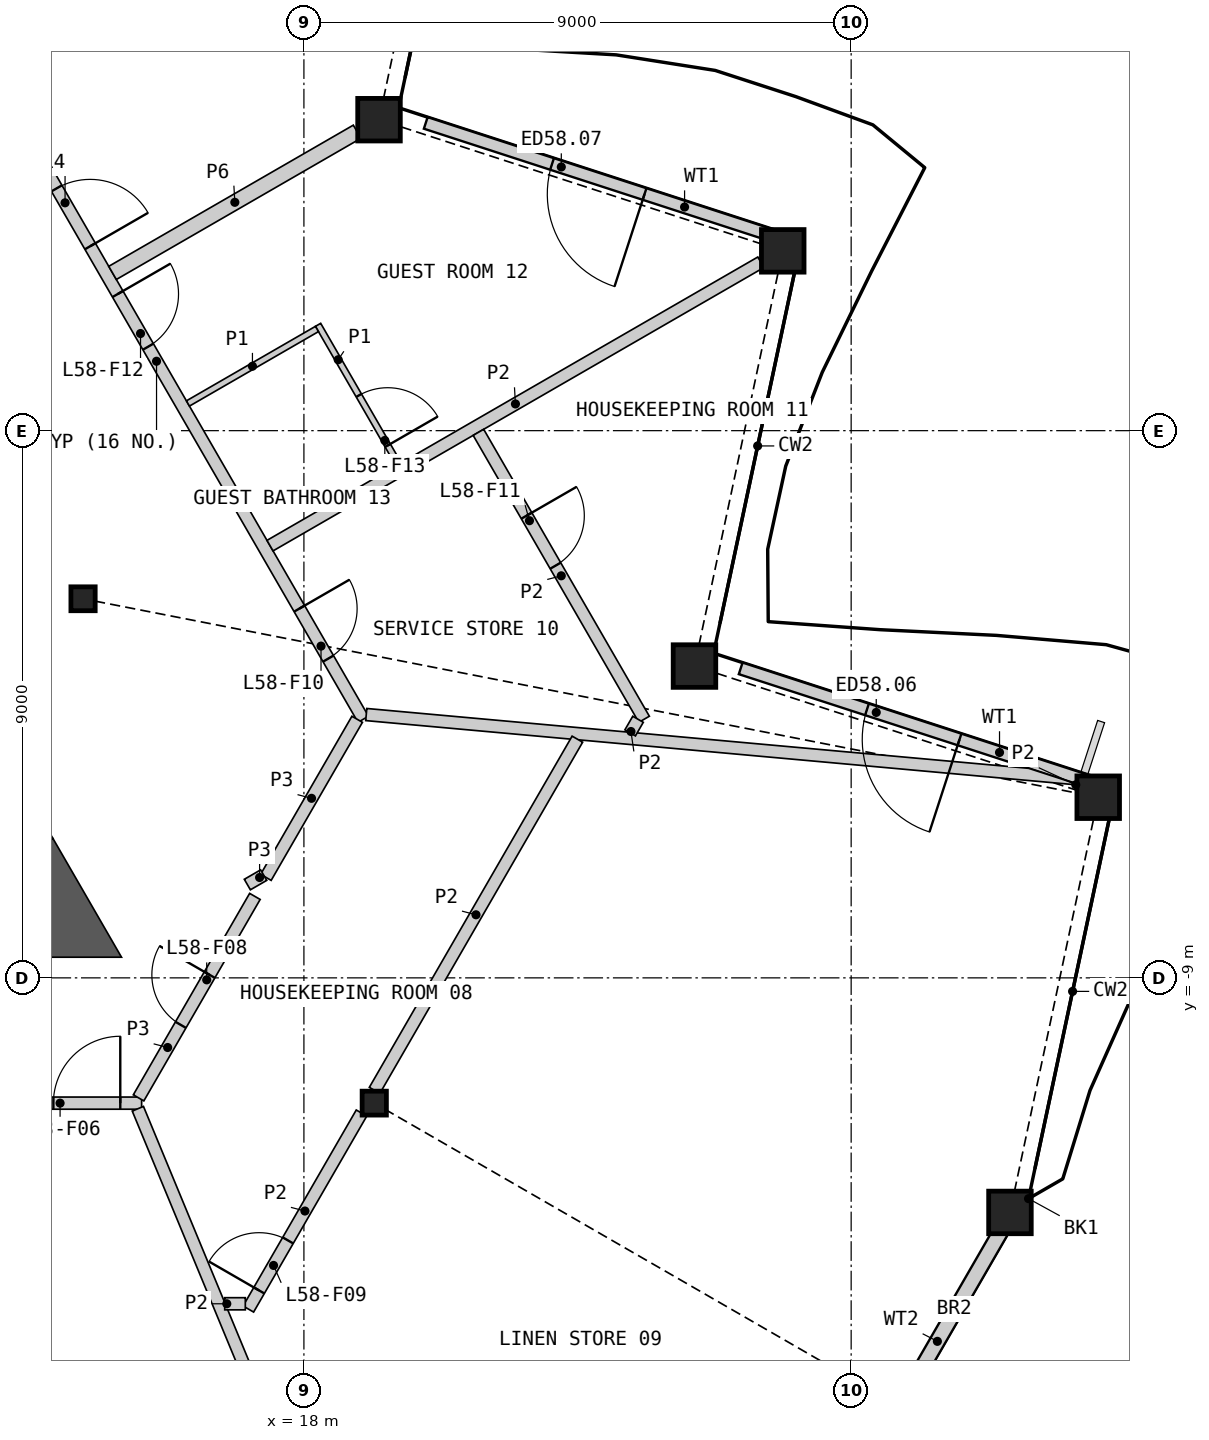
"""IFC4 building model, lengths in metres.
Left out: names, types, materials, properties, quantities, classifications, styles, units other than length and angle.
Written with IfcOpenShell. Run it as: python <this file> out.ifc"""

import sys

from ifc_helpers import new_model, si_unit, direction, frame, frame_2d, origin, origin_2d, place, context, subcontext, project, spatial, polyline, rectangle, hollow_rectangle, i_section, outline, extrude, element, fill, save


model = new_model("IFC4")
c1 = context("Model", 3, precision=1e-05, world=origin(), true_north=direction((0.0, 1.0)))
c2 = subcontext(c1, "Body", "Model", "MODEL_VIEW")
j1 = project(units=[si_unit("LENGTHUNIT", "METRE"), si_unit("PLANEANGLEUNIT", "RADIAN")], contexts=[c1])
p1 = place(None, origin())
s1 = spatial("IfcSite", under=j1, at=p1, CompositionType="ELEMENT")
p2 = place(p1, origin())
s2 = spatial("IfcBuilding", under=s1, at=p2, CompositionType="ELEMENT")
p3 = place(p2, frame((0.0, 0.0, 259.8)))
s3 = spatial("IfcBuildingStorey", under=s2, at=p3, CompositionType="ELEMENT", Elevation=259.8)
for number, where, z_axis, x_axis in (
    (1, (29.612, -12.858, 0.0), (0.0, 0.0, 1.0), (1.0, 0.0, 0.0)),
    (2, (31.063, -6.029, 0.0), (0.0, 0.0, 1.0), (1.0, 0.0, 0.0)),
    (3, (24.423, -3.872, 0.0), (0.0, 0.0, 1.0), (1.0, 0.0, 0.0)),
    (4, (25.875, 2.957, 0.0), (0.0, 0.0, 1.0), (1.0, 0.0, 0.0)),
    (5, (19.235, 5.115, 0.0), (0.0, 0.0, 1.0), (1.0, 0.0, 0.0)),
):
    element("IfcColumn", number, at=place(p3, frame(where, z_axis=z_axis, x_axis=x_axis)), inside=s3, PredefinedType="COLUMN", context=c2, shape_type="SweptSolid", body=[
        extrude(hollow_rectangle(XDim=0.7, YDim=0.7, WallThickness=0.045, at=origin_2d()), origin(), (0.0, 0.0, 1.0), 3.6),
    ])
for number, where, z_axis, x_axis in (
    (6, (19.157, -11.06, 0.0), (0.0, 0.0, 1.0), (1.0, 0.0, 0.0)),
    (7, (14.368, -2.765, 0.0), (0.0, 0.0, 1.0), (1.0, 0.0, 0.0)),
):
    element("IfcColumn", number, at=place(p3, frame(where, z_axis=z_axis, x_axis=x_axis)), inside=s3, PredefinedType="COLUMN", context=c2, shape_type="SweptSolid", body=[
        extrude(i_section(OverallWidth=0.399, OverallDepth=0.393, WebThickness=0.023, FlangeThickness=0.037, at=origin_2d()), origin(), (0.0, 0.0, 1.0), 3.6),
    ])
p4 = place(p3, frame((28.038, -15.637, 0.0), z_axis=(0.0, 0.0, 1.0), x_axis=(0.500023511883, 0.866011828767, 0.0)))
e8 = element("IfcWall", 8, at=p4, inside=s3, PredefinedType="SOLIDWALL", context=c2, shape_type="SweptSolid", body=[
    extrude(rectangle(XDim=3.042, YDim=0.25, at=frame_2d((1.521, 0.0))), origin(), (0.0, 0.0, 1.0), 2.701),
])
p5 = place(p3, frame((30.859, -5.754, 0.0), z_axis=(0.0, 0.0, 1.0), x_axis=(-0.951049400374, 0.309038894069, 0.0)))
e9 = element("IfcWall", 9, at=p5, inside=s3, PredefinedType="SOLIDWALL", context=c2, shape_type="SweptSolid", body=[
    extrude(rectangle(XDim=5.968, YDim=0.2, at=frame_2d((2.984, 0.0))), origin(), (0.0, 0.0, 1.0), 2.701),
])
p6 = place(p5, frame((2.184, 0.0, 0.0)))
e10 = element("IfcOpeningElement", 10, at=p6, cuts=e9, PredefinedType="OPENING", context=c2, shape_type="SweptSolid", body=[
    extrude(rectangle(XDim=1.6, YDim=2.4, at=frame_2d((0.8, 1.2))), frame((0.0, 0.11, 0.0), z_axis=(0.0, -1.0, 0.0), x_axis=(1.0, 0.0, 0.0)), (0.0, 0.0, 1.0), 0.22),
])
p7 = place(p3, frame((25.679, 3.217, 0.0), z_axis=(0.0, 0.0, 1.0), x_axis=(-0.951049400374, 0.309038894069, 0.0)))
e11 = element("IfcWall", 11, at=p7, inside=s3, PredefinedType="SOLIDWALL", context=c2, shape_type="SweptSolid", body=[
    extrude(rectangle(XDim=5.968, YDim=0.2, at=frame_2d((2.984, 0.0))), origin(), (0.0, 0.0, 1.0), 2.701),
])
p8 = place(p7, frame((2.184, 0.0, 0.0)))
e12 = element("IfcOpeningElement", 12, at=p8, cuts=e11, PredefinedType="OPENING", context=c2, shape_type="SweptSolid", body=[
    extrude(rectangle(XDim=1.6, YDim=2.4, at=frame_2d((0.8, 1.2))), frame((0.0, 0.11, 0.0), z_axis=(0.0, -1.0, 0.0), x_axis=(1.0, 0.0, 0.0)), (0.0, 0.0, 1.0), 0.22),
])
p9 = place(p3, frame((13.311, -7.035, 0.0), z_axis=(0.0, 0.0, 1.0), x_axis=(-0.500003555838, 0.866023350811, 0.0)))
e13 = element("IfcWall", 13, at=p9, inside=s3, PredefinedType="SHEAR", context=c2, shape_type="SweptSolid", body=[
    extrude(rectangle(XDim=4.26, YDim=1.3, at=frame_2d((2.13, 0.0))), origin(), (0.0, 0.0, 1.0), 3.25),
])
p10 = place(p3, origin())
e14 = element("IfcWall", 14, at=p10, inside=s3, PredefinedType="SHEAR", context=c2, shape_type="SweptSolid", body=[
    extrude(outline(polyline([(12.748, -8.66), (12.748, -7.36), (13.874, -6.71), (15.0, -8.66), (12.748, -8.66)])), origin(), (0.0, 0.0, 1.0), 3.25),
])
p11 = place(p3, frame((5.377, 18.807, 0.0), z_axis=(0.0, 0.0, 1.0), x_axis=(0.499999852422, -0.866025488988, 0.0)))
e15 = element("IfcWall", 15, at=p11, inside=s3, PredefinedType="PARTITIONING", context=c2, shape_type="SweptSolid", body=[
    extrude(rectangle(XDim=27.198, YDim=0.2, at=frame_2d((13.599, 0.0))), origin(), (0.0, 0.0, 1.0), 3.25),
])
p12 = place(p11, frame((25.096, 0.0, 0.0)))
e16 = element("IfcOpeningElement", 16, at=p12, cuts=e15, PredefinedType="OPENING", context=c2, shape_type="SweptSolid", body=[
    extrude(rectangle(XDim=0.95, YDim=2.1, at=frame_2d((0.475, 1.05))), frame((0.0, 0.11, 0.0), z_axis=(0.0, -1.0, 0.0), x_axis=(1.0, 0.0, 0.0)), (0.0, 0.0, 1.0), 0.22),
])
p13 = place(p11, frame((19.122, 0.0, 0.0)))
e17 = element("IfcOpeningElement", 17, at=p13, cuts=e15, PredefinedType="OPENING", context=c2, shape_type="SweptSolid", body=[
    extrude(rectangle(XDim=1.0, YDim=2.1, at=frame_2d((0.5, 1.05))), frame((0.0, 0.11, 0.0), z_axis=(0.0, -1.0, 0.0), x_axis=(1.0, 0.0, 0.0)), (0.0, 0.0, 1.0), 0.22),
])
p14 = place(p11, frame((17.115, 0.0, 0.0)))
e18 = element("IfcOpeningElement", 18, at=p14, cuts=e15, PredefinedType="OPENING", context=c2, shape_type="SweptSolid", body=[
    extrude(rectangle(XDim=1.1, YDim=2.1, at=frame_2d((0.55, 1.05))), frame((0.0, 0.11, 0.0), z_axis=(0.0, -1.0, 0.0), x_axis=(1.0, 0.0, 0.0)), (0.0, 0.0, 1.0), 0.22),
])
p15 = place(p11, frame((0.35, 0.0, 0.0)))
e19 = element("IfcOpeningElement", 19, at=p15, cuts=e15, PredefinedType="OPENING", context=c2, shape_type="SweptSolid", body=[
    extrude(rectangle(XDim=1.1, YDim=2.1, at=frame_2d((0.55, 1.05))), frame((0.0, 0.11, 0.0), z_axis=(0.0, -1.0, 0.0), x_axis=(1.0, 0.0, 0.0)), (0.0, 0.0, 1.0), 0.22),
])
p16 = place(p3, frame((9.788, -11.06, 0.0), z_axis=(0.0, 0.0, 1.0), x_axis=(1.0, 0.0, 0.0)))
e20 = element("IfcWall", 20, at=p16, inside=s3, PredefinedType="PARTITIONING", context=c2, shape_type="SweptSolid", body=[
    extrude(rectangle(XDim=5.543, YDim=0.2, at=frame_2d((2.771, 0.0))), origin(), (0.0, 0.0, 1.0), 3.25),
])
p17 = place(p16, frame((4.092, 0.0, 0.0)))
e21 = element("IfcOpeningElement", 21, at=p17, cuts=e20, PredefinedType="OPENING", context=c2, shape_type="SweptSolid", body=[
    extrude(rectangle(XDim=1.1, YDim=2.1, at=frame_2d((0.55, 1.05))), frame((0.0, 0.11, 0.0), z_axis=(0.0, -1.0, 0.0), x_axis=(1.0, 0.0, 0.0)), (0.0, 0.0, 1.0), 0.22),
])
p18 = place(p3, frame((14.853, 2.594, 0.0), z_axis=(0.0, 0.0, 1.0), x_axis=(0.866021891294, 0.500006083763, 0.0)))
e22 = element("IfcWall", 22, at=p18, inside=s3, PredefinedType="PARTITIONING", context=c2, shape_type="SweptSolid", body=[
    extrude(rectangle(XDim=4.645, YDim=0.25, at=frame_2d((2.322, 0.0))), origin(), (0.0, 0.0, 1.0), 2.404),
])
p19 = place(p3, frame((15.281, -10.974, 0.0), z_axis=(0.0, 0.0, 1.0), x_axis=(0.499989446428, 0.866031496806, 0.0)))
e23 = element("IfcWall", 23, at=p19, inside=s3, PredefinedType="PARTITIONING", context=c2, shape_type="SweptSolid", body=[
    extrude(rectangle(XDim=3.826, YDim=0.2, at=frame_2d((1.913, 0.0))), origin(), (0.0, 0.0, 1.0), 3.25),
])
p20 = place(p19, frame((1.386, 0.0, 0.0)))
e24 = element("IfcOpeningElement", 24, at=p20, cuts=e23, PredefinedType="OPENING", context=c2, shape_type="SweptSolid", body=[
    extrude(rectangle(XDim=0.95, YDim=2.1, at=frame_2d((0.475, 1.05))), frame((0.0, 0.11, 0.0), z_axis=(0.0, -1.0, 0.0), x_axis=(1.0, 0.0, 0.0)), (0.0, 0.0, 1.0), 0.22),
])
p21 = place(p3, frame((17.375, -7.347, 0.0), z_axis=(0.0, 0.0, 1.0), x_axis=(0.499952404951, 0.866052881055, 0.0)))
e25 = element("IfcWall", 25, at=p21, inside=s3, PredefinedType="PARTITIONING", context=c2, shape_type="SweptSolid", body=[
    extrude(rectangle(XDim=3.002, YDim=0.2, at=frame_2d((1.501, 0.0))), origin(), (0.0, 0.0, 1.0), 3.25),
])
p22 = place(p3, frame((17.07, -7.465, 0.0), z_axis=(0.0, 0.0, 1.0), x_axis=(0.866054481515, 0.499949632511, 0.0)))
e26 = element("IfcWall", 26, at=p22, inside=s3, PredefinedType="PARTITIONING", context=c2, shape_type="SweptSolid", body=[
    extrude(rectangle(XDim=0.31, YDim=0.2, at=frame_2d((0.155, 0.0))), origin(), (0.0, 0.0, 1.0), 3.25),
])
p23 = place(p3, frame((15.269, -11.153, 0.0), z_axis=(0.0, 0.0, 1.0), x_axis=(0.382692998932, -0.923875569851, 0.0)))
e27 = element("IfcWall", 27, at=p23, inside=s3, PredefinedType="PARTITIONING", context=c2, shape_type="SweptSolid", body=[
    extrude(rectangle(XDim=13.397, YDim=0.2, at=frame_2d((6.698, 0.0))), origin(), (0.0, 0.0, 1.0), 2.404),
])
p24 = place(p3, origin())
e28 = element("IfcWall", 28, at=p24, inside=s3, PredefinedType="PARTITIONING", context=c2, shape_type="SweptSolid", body=[
    extrude(outline(polyline([(30.694, -5.824), (19.017, -4.769), (19.034, -4.57), (29.918, -5.553), (30.696, -5.806), (30.694, -5.824)])), origin(), (0.0, 0.0, 1.0), 2.404),
])
p25 = place(p3, frame((17.443, -1.891, 0.0), z_axis=(0.0, 0.0, 1.0), x_axis=(0.866019838429, 0.500009639354, 0.0)))
e29 = element("IfcWall", 29, at=p25, inside=s3, PredefinedType="PARTITIONING", context=c2, shape_type="SweptSolid", body=[
    extrude(rectangle(XDim=9.321, YDim=0.2, at=frame_2d((4.661, 0.0))), origin(), (0.0, 0.0, 1.0), 2.404),
])
p26 = place(p3, frame((19.162, -10.851, 0.0), z_axis=(0.0, 0.0, 1.0), x_axis=(0.500008654708, 0.866020406929, 0.0)))
e30 = element("IfcWall", 30, at=p26, inside=s3, PredefinedType="PARTITIONING", context=c2, shape_type="SweptSolid", body=[
    extrude(rectangle(XDim=6.67, YDim=0.2, at=frame_2d((3.335, 0.0))), origin(), (0.0, 0.0, 1.0), 2.404),
])
p27 = place(p3, frame((20.87, -0.028, 0.0), z_axis=(0.0, 0.0, 1.0), x_axis=(0.499993928037, -0.866028909405, 0.0)))
e31 = element("IfcWall", 31, at=p27, inside=s3, PredefinedType="PARTITIONING", context=c2, shape_type="SweptSolid", body=[
    extrude(rectangle(XDim=5.449, YDim=0.2, at=frame_2d((2.725, 0.0))), origin(), (0.0, 0.0, 1.0), 2.404),
])
p28 = place(p27, frame((1.583, 0.0, 0.0)))
e32 = element("IfcOpeningElement", 32, at=p28, cuts=e31, PredefinedType="OPENING", context=c2, shape_type="SweptSolid", body=[
    extrude(rectangle(XDim=0.95, YDim=2.1, at=frame_2d((0.475, 1.05))), frame((0.0, 0.11, 0.0), z_axis=(0.0, -1.0, 0.0), x_axis=(1.0, 0.0, 0.0)), (0.0, 0.0, 1.0), 0.22),
])
p29 = place(p3, frame((17.086, -14.447, 0.0), z_axis=(0.0, 0.0, 1.0), x_axis=(0.500004411858, 0.866022856582, 0.0)))
e33 = element("IfcWall", 33, at=p29, inside=s3, PredefinedType="PARTITIONING", context=c2, shape_type="SweptSolid", body=[
    extrude(rectangle(XDim=3.723, YDim=0.2, at=frame_2d((1.861, 0.0))), origin(), (0.0, 0.0, 1.0), 2.404),
])
p30 = place(p29, frame((0.353, 0.0, 0.0)))
e34 = element("IfcOpeningElement", 34, at=p30, cuts=e33, PredefinedType="OPENING", context=c2, shape_type="SweptSolid", body=[
    extrude(rectangle(XDim=0.95, YDim=2.1, at=frame_2d((0.475, 1.05))), frame((0.0, 0.11, 0.0), z_axis=(0.0, -1.0, 0.0), x_axis=(1.0, 0.0, 0.0)), (0.0, 0.0, 1.0), 0.22),
])
p31 = place(p3, frame((16.698, -14.36, 0.0), z_axis=(0.0, 0.0, 1.0), x_axis=(1.0, 0.0, 0.0)))
e35 = element("IfcWall", 35, at=p31, inside=s3, PredefinedType="PARTITIONING", context=c2, shape_type="SweptSolid", body=[
    extrude(rectangle(XDim=0.338, YDim=0.2, at=frame_2d((0.169, 0.0))), origin(), (0.0, 0.0, 1.0), 2.404),
])
p32 = place(p3, frame((23.366, -4.97, 0.0), z_axis=(0.0, 0.0, 1.0), x_axis=(0.500104332946, 0.86596515875, 0.0)))
e36 = element("IfcWall", 36, at=p32, inside=s3, PredefinedType="PARTITIONING", context=c2, shape_type="SweptSolid", body=[
    extrude(rectangle(XDim=0.258, YDim=0.2, at=frame_2d((0.129, 0.0))), origin(), (0.0, 0.0, 1.0), 2.404),
])
p33 = place(p3, frame((18.233, 1.74, 0.0), z_axis=(0.0, 0.0, 1.0), x_axis=(0.499993606316, -0.866029095148, 0.0)))
e37 = element("IfcWall", 37, at=p33, inside=s3, PredefinedType="PARTITIONING", context=c2, shape_type="SweptSolid", body=[
    extrude(rectangle(XDim=2.65, YDim=0.1, at=frame_2d((1.325, 0.0))), origin(), (0.0, 0.0, 1.0), 2.404),
])
p34 = place(p33, frame((1.341, 0.0, 0.0)))
e38 = element("IfcOpeningElement", 38, at=p34, cuts=e37, PredefinedType="OPENING", context=c2, shape_type="SweptSolid", body=[
    extrude(rectangle(XDim=0.95, YDim=2.1, at=frame_2d((0.475, 1.05))), frame((0.0, 0.06, 0.0), z_axis=(0.0, -1.0, 0.0), x_axis=(1.0, 0.0, 0.0)), (0.0, 0.0, 1.0), 0.12),
])
p35 = place(p3, frame((16.093, 0.447, 0.0), z_axis=(0.0, 0.0, 1.0), x_axis=(0.866057815567, 0.499943856944, 0.0)))
e39 = element("IfcWall", 39, at=p35, inside=s3, PredefinedType="PARTITIONING", context=c2, shape_type="SweptSolid", body=[
    extrude(rectangle(XDim=2.45, YDim=0.1, at=frame_2d((1.225, 0.0))), origin(), (0.0, 0.0, 1.0), 2.404),
])
p36 = place(p6, origin())
e40 = element("IfcDoor", 40, at=p36, inside=s3, OperationType="DOUBLE_DOOR_SINGLE_SWING", PredefinedType="DOOR", context=c2, shape_type="SweptSolid", body=[
    extrude(rectangle(XDim=1.6, YDim=2.4, at=frame_2d((0.8, 1.2))), frame((0.0, 0.025, 0.0), z_axis=(0.0, -1.0, 0.0), x_axis=(1.0, 0.0, 0.0)), (0.0, 0.0, 1.0), 0.05),
])
fill(e10, e40)
p37 = place(p8, origin())
e41 = element("IfcDoor", 41, at=p37, inside=s3, OperationType="DOUBLE_DOOR_SINGLE_SWING", PredefinedType="DOOR", context=c2, shape_type="SweptSolid", body=[
    extrude(rectangle(XDim=1.6, YDim=2.4, at=frame_2d((0.8, 1.2))), frame((0.0, 0.025, 0.0), z_axis=(0.0, -1.0, 0.0), x_axis=(1.0, 0.0, 0.0)), (0.0, 0.0, 1.0), 0.05),
])
fill(e12, e41)
p38 = place(p17, origin())
e42 = element("IfcDoor", 42, at=p38, inside=s3, OperationType="SINGLE_SWING_RIGHT", PredefinedType="DOOR", context=c2, shape_type="SweptSolid", body=[
    extrude(rectangle(XDim=1.1, YDim=2.1, at=frame_2d((0.55, 1.05))), frame((0.0, 0.025, 0.0), z_axis=(0.0, -1.0, 0.0), x_axis=(1.0, 0.0, 0.0)), (0.0, 0.0, 1.0), 0.05),
])
fill(e21, e42)
p39 = place(p20, origin())
e43 = element("IfcDoor", 43, at=p39, inside=s3, OperationType="SINGLE_SWING_RIGHT", PredefinedType="DOOR", context=c2, shape_type="SweptSolid", body=[
    extrude(rectangle(XDim=0.95, YDim=2.1, at=frame_2d((0.475, 1.05))), frame((0.0, 0.025, 0.0), z_axis=(0.0, -1.0, 0.0), x_axis=(1.0, 0.0, 0.0)), (0.0, 0.0, 1.0), 0.05),
])
fill(e24, e43)
p40 = place(p30, origin())
e44 = element("IfcDoor", 44, at=p40, inside=s3, OperationType="SINGLE_SWING_LEFT", PredefinedType="DOOR", context=c2, shape_type="SweptSolid", body=[
    extrude(rectangle(XDim=0.95, YDim=2.1, at=frame_2d((0.475, 1.05))), frame((0.0, 0.025, 0.0), z_axis=(0.0, -1.0, 0.0), x_axis=(1.0, 0.0, 0.0)), (0.0, 0.0, 1.0), 0.05),
])
fill(e34, e44)
p41 = place(p12, origin())
e45 = element("IfcDoor", 45, at=p41, inside=s3, OperationType="SINGLE_SWING_LEFT", PredefinedType="DOOR", context=c2, shape_type="SweptSolid", body=[
    extrude(rectangle(XDim=0.95, YDim=2.1, at=frame_2d((0.475, 1.05))), frame((0.0, 0.025, 0.0), z_axis=(0.0, -1.0, 0.0), x_axis=(1.0, 0.0, 0.0)), (0.0, 0.0, 1.0), 0.05),
])
fill(e16, e45)
p42 = place(p28, origin())
e46 = element("IfcDoor", 46, at=p42, inside=s3, OperationType="SINGLE_SWING_LEFT", PredefinedType="DOOR", context=c2, shape_type="SweptSolid", body=[
    extrude(rectangle(XDim=0.95, YDim=2.1, at=frame_2d((0.475, 1.05))), frame((0.0, 0.025, 0.0), z_axis=(0.0, -1.0, 0.0), x_axis=(1.0, 0.0, 0.0)), (0.0, 0.0, 1.0), 0.05),
])
fill(e32, e46)
p43 = place(p13, origin())
e47 = element("IfcDoor", 47, at=p43, inside=s3, OperationType="SINGLE_SWING_LEFT", PredefinedType="DOOR", context=c2, shape_type="SweptSolid", body=[
    extrude(rectangle(XDim=1.0, YDim=2.1, at=frame_2d((0.5, 1.05))), frame((0.0, 0.025, 0.0), z_axis=(0.0, -1.0, 0.0), x_axis=(1.0, 0.0, 0.0)), (0.0, 0.0, 1.0), 0.05),
])
fill(e17, e47)
p44 = place(p34, origin())
e48 = element("IfcDoor", 48, at=p44, inside=s3, OperationType="SINGLE_SWING_RIGHT", PredefinedType="DOOR", context=c2, shape_type="SweptSolid", body=[
    extrude(rectangle(XDim=0.95, YDim=2.1, at=frame_2d((0.475, 1.05))), frame((0.0, 0.025, 0.0), z_axis=(0.0, -1.0, 0.0), x_axis=(1.0, 0.0, 0.0)), (0.0, 0.0, 1.0), 0.05),
])
fill(e38, e48)
p45 = place(p14, origin())
e49 = element("IfcDoor", 49, at=p45, inside=s3, OperationType="SINGLE_SWING_RIGHT", PredefinedType="DOOR", context=c2, shape_type="SweptSolid", body=[
    extrude(rectangle(XDim=1.1, YDim=2.1, at=frame_2d((0.55, 1.05))), frame((0.0, 0.025, 0.0), z_axis=(0.0, -1.0, 0.0), x_axis=(1.0, 0.0, 0.0)), (0.0, 0.0, 1.0), 0.05),
])
fill(e18, e49)
save(model, sys.argv[1])
